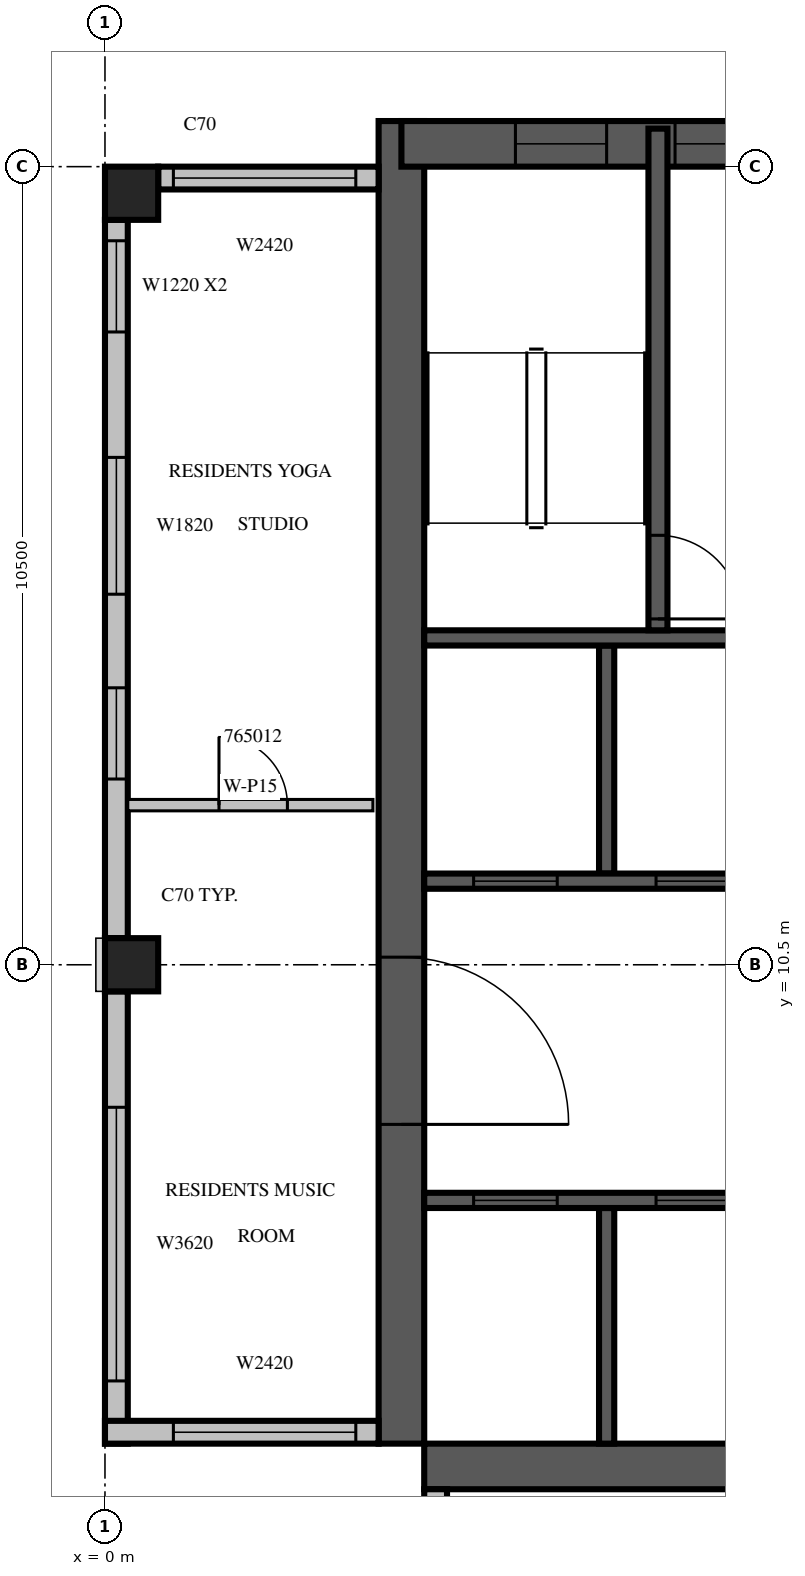
"""IFC4 building model, lengths in metres.
Left out: names, types, materials, properties, quantities, classifications, styles, units other than length and angle.
Written with IfcOpenShell. Run it as: python <this file> out.ifc"""

import sys

from ifc_helpers import new_model, si_unit, direction, frame, frame_2d, origin, origin_2d, place, context, subcontext, project, spatial, rectangle, extrude, source, transform, mapped, element, fill, save


model = new_model("IFC4")
c1 = context("Model", 3, precision=1e-05, world=origin(), true_north=direction((0.0, 1.0)))
c2 = subcontext(c1, "Body", "Model", "MODEL_VIEW")
j1 = project(units=[si_unit("LENGTHUNIT", "METRE"), si_unit("PLANEANGLEUNIT", "RADIAN")], contexts=[c1])
p1 = place(None, origin())
s1 = spatial("IfcSite", under=j1, at=p1, CompositionType="ELEMENT")
p2 = place(p1, origin())
s2 = spatial("IfcBuilding", under=s1, at=p2, CompositionType="ELEMENT")
p3 = place(p2, frame((0.0, 0.0, 288.0)))
s3 = spatial("IfcBuildingStorey", under=s2, at=p3, CompositionType="ELEMENT", Elevation=288.0)
m1 = source(origin(), c2, "Body", "SweptSolid", [
    extrude(rectangle(XDim=0.7, YDim=0.7, at=origin_2d()), origin(), (0.0, 0.0, 1.0), 3.5),
])
for number, where, z_axis, x_axis in (
    (1, (0.35, 10.5, 0.0), (0.0, 0.0, 1.0), (1.0, 0.0, 0.0)),
    (2, (0.35, 20.65, 0.0), (0.0, 0.0, 1.0), (1.0, 0.0, 0.0)),
):
    element("IfcColumn", number, at=place(p3, frame(where, z_axis=z_axis, x_axis=x_axis)), inside=s3, PredefinedType="COLUMN", context=c2, shape_type="MappedRepresentation", body=[
        mapped(m1, transform((0.0, 0.0, 0.0), scale=1.0)),
    ])
m2 = source(origin(), c2, "Body", "SweptSolid", [
    extrude(rectangle(XDim=17.4, YDim=0.6, at=frame_2d((8.7, 0.0))), origin(), (0.0, 0.0, 1.0), 3.5),
])
p4 = place(p3, frame((3.9, 4.2, 0.0), z_axis=(0.0, 0.0, 1.0), x_axis=(0.0, 1.0, 0.0)))
e3 = element("IfcWall", 3, at=p4, inside=s3, PredefinedType="SHEAR", context=c2, shape_type="MappedRepresentation", body=[
    mapped(m2, transform((0.0, 0.0, 0.0), scale=1.0)),
])
m3 = source(origin(), c2, "Body", "SweptSolid", [
    extrude(rectangle(XDim=2.2, YDim=2.1, at=frame_2d((1.1, 1.05))), frame((0.0, 0.31, 0.0), z_axis=(0.0, -1.0, 0.0), x_axis=(1.0, 0.0, 0.0)), (0.0, 0.0, 1.0), 0.62),
])
p5 = place(p4, frame((4.2, 0.0, 0.0)))
e4 = element("IfcOpeningElement", 4, at=p5, cuts=e3, PredefinedType="OPENING", context=c2, shape_type="MappedRepresentation", body=[
    mapped(m3, transform((0.0, 0.0, 0.0), scale=1.0)),
])
p6 = place(p3, frame((4.2, 3.9, 0.0), z_axis=(0.0, 0.0, 1.0), x_axis=(1.0, 0.0, 0.0)))
e5 = element("IfcWall", 5, at=p6, inside=s3, PredefinedType="SHEAR", context=c2, shape_type="MappedRepresentation", body=[
    mapped(m2, transform((0.0, 0.0, 0.0), scale=1.0)),
])
m4 = source(origin(), c2, "Body", "SweptSolid", [
    extrude(rectangle(XDim=0.9, YDim=2.1, at=frame_2d((0.45, 1.05))), frame((0.0, 0.31, 0.0), z_axis=(0.0, -1.0, 0.0), x_axis=(1.0, 0.0, 0.0)), (0.0, 0.0, 1.0), 0.62),
])
p7 = place(p6, frame((15.2, 0.0, 0.0)))
e6 = element("IfcOpeningElement", 6, at=p7, cuts=e5, PredefinedType="OPENING", context=c2, shape_type="MappedRepresentation", body=[
    mapped(m4, transform((0.0, 0.0, 0.0), scale=1.0)),
])
m5 = source(origin(), c2, "Body", "SweptSolid", [
    extrude(rectangle(XDim=6.6, YDim=0.6, at=frame_2d((3.3, 0.0))), origin(), (0.0, 0.0, 1.0), 3.5),
])
p8 = place(p3, frame((3.9, 21.3, 0.0), z_axis=(0.0, 0.0, 1.0), x_axis=(1.0, 0.0, 0.0)))
e7 = element("IfcWall", 7, at=p8, inside=s3, PredefinedType="SHEAR", context=c2, shape_type="MappedRepresentation", body=[
    mapped(m5, transform((0.0, 0.0, 0.0), scale=1.0)),
])
m6 = source(origin(), c2, "Body", "SweptSolid", [
    extrude(rectangle(XDim=1.2, YDim=2.4, at=frame_2d((0.6, 1.2))), frame((0.0, 0.31, 0.0), z_axis=(0.0, -1.0, 0.0), x_axis=(1.0, 0.0, 0.0)), (0.0, 0.0, 1.0), 0.62),
])
p9 = place(p8, frame((1.5, 0.0, 0.6)))
e8 = element("IfcOpeningElement", 8, at=p9, cuts=e7, PredefinedType="OPENING", context=c2, shape_type="MappedRepresentation", body=[
    mapped(m6, transform((0.0, 0.0, 0.0), scale=1.0)),
])
p10 = place(p8, frame((3.6, 0.0, 0.6)))
e9 = element("IfcOpeningElement", 9, at=p10, cuts=e7, PredefinedType="OPENING", context=c2, shape_type="MappedRepresentation", body=[
    mapped(m6, transform((0.0, 0.0, 0.0), scale=1.0)),
])
m7 = source(origin(), c2, "Body", "SweptSolid", [
    extrude(rectangle(XDim=2.9, YDim=0.3, at=frame_2d((1.45, 0.0))), origin(), (0.0, 0.0, 1.0), 3.1),
])
p11 = place(p3, frame((3.6, 20.85, 0.0), z_axis=(0.0, 0.0, 1.0), x_axis=(-1.0, 0.0, 0.0)))
e10 = element("IfcWall", 10, at=p11, inside=s3, PredefinedType="STANDARD", context=c2, shape_type="MappedRepresentation", body=[
    mapped(m7, transform((0.0, 0.0, 0.0), scale=1.0)),
])
m8 = source(origin(), c2, "Body", "SweptSolid", [
    extrude(rectangle(XDim=2.4, YDim=2.0, at=frame_2d((1.2, 1.0))), frame((0.0, 0.16, 0.0), z_axis=(0.0, -1.0, 0.0), x_axis=(1.0, 0.0, 0.0)), (0.0, 0.0, 1.0), 0.32),
])
p12 = place(p11, frame((0.3, 0.0, 0.6)))
e11 = element("IfcOpeningElement", 11, at=p12, cuts=e10, PredefinedType="OPENING", context=c2, shape_type="MappedRepresentation", body=[
    mapped(m8, transform((0.0, 0.0, 0.0), scale=1.0)),
])
p13 = place(p3, frame((0.15, 20.3, 0.0), z_axis=(0.0, 0.0, 1.0), x_axis=(0.0, -1.0, 0.0)))
e12 = element("IfcWall", 12, at=p13, inside=s3, PredefinedType="STANDARD", context=c2, shape_type="SweptSolid", body=[
    extrude(rectangle(XDim=9.45, YDim=0.3, at=frame_2d((4.725, 0.0))), origin(), (0.0, 0.0, 1.0), 3.1),
])
m9 = source(origin(), c2, "Body", "SweptSolid", [
    extrude(rectangle(XDim=1.2, YDim=2.0, at=frame_2d((0.6, 1.0))), frame((0.0, 0.16, 0.0), z_axis=(0.0, -1.0, 0.0), x_axis=(1.0, 0.0, 0.0)), (0.0, 0.0, 1.0), 0.32),
])
p14 = place(p13, frame((0.275, 0.0, 0.6)))
e13 = element("IfcOpeningElement", 13, at=p14, cuts=e12, PredefinedType="OPENING", context=c2, shape_type="MappedRepresentation", body=[
    mapped(m9, transform((0.0, 0.0, 0.0), scale=1.0)),
])
m10 = source(origin(), c2, "Body", "SweptSolid", [
    extrude(rectangle(XDim=1.8, YDim=2.0, at=frame_2d((0.9, 1.0))), frame((0.0, 0.16, 0.0), z_axis=(0.0, -1.0, 0.0), x_axis=(1.0, 0.0, 0.0)), (0.0, 0.0, 1.0), 0.32),
])
p15 = place(p13, frame((3.125, 0.0, 0.6)))
e14 = element("IfcOpeningElement", 14, at=p15, cuts=e12, PredefinedType="OPENING", context=c2, shape_type="MappedRepresentation", body=[
    mapped(m10, transform((0.0, 0.0, 0.0), scale=1.0)),
])
p16 = place(p13, frame((6.156, 0.0, 0.6)))
e15 = element("IfcOpeningElement", 15, at=p16, cuts=e12, PredefinedType="OPENING", context=c2, shape_type="MappedRepresentation", body=[
    mapped(m9, transform((0.0, 0.0, 0.0), scale=1.0)),
])
m11 = source(origin(), c2, "Body", "SweptSolid", [
    extrude(rectangle(XDim=5.95, YDim=0.3, at=frame_2d((2.975, 0.0))), origin(), (0.0, 0.0, 1.0), 3.1),
])
p17 = place(p3, frame((0.15, 10.15, 0.0), z_axis=(0.0, 0.0, 1.0), x_axis=(0.0, -1.0, 0.0)))
e16 = element("IfcWall", 16, at=p17, inside=s3, PredefinedType="STANDARD", context=c2, shape_type="MappedRepresentation", body=[
    mapped(m11, transform((0.0, 0.0, 0.0), scale=1.0)),
])
m12 = source(origin(), c2, "Body", "SweptSolid", [
    extrude(rectangle(XDim=3.6, YDim=2.0, at=frame_2d((1.8, 1.0))), frame((0.0, 0.16, 0.0), z_axis=(0.0, -1.0, 0.0), x_axis=(1.0, 0.0, 0.0)), (0.0, 0.0, 1.0), 0.32),
])
p18 = place(p17, frame((1.525, 0.0, 0.6)))
e17 = element("IfcOpeningElement", 17, at=p18, cuts=e16, PredefinedType="OPENING", context=c2, shape_type="MappedRepresentation", body=[
    mapped(m12, transform((0.0, 0.0, 0.0), scale=1.0)),
])
m13 = source(origin(), c2, "Body", "SweptSolid", [
    extrude(rectangle(XDim=3.6, YDim=0.3, at=frame_2d((1.8, 0.0))), origin(), (0.0, 0.0, 1.0), 3.1),
])
p19 = place(p3, frame((0.0, 4.35, 0.0), z_axis=(0.0, 0.0, 1.0), x_axis=(1.0, 0.0, 0.0)))
e18 = element("IfcWall", 18, at=p19, inside=s3, PredefinedType="STANDARD", context=c2, shape_type="MappedRepresentation", body=[
    mapped(m13, transform((0.0, 0.0, 0.0), scale=1.0)),
])
p20 = place(p19, frame((0.9, 0.0, 0.6)))
e19 = element("IfcOpeningElement", 19, at=p20, cuts=e18, PredefinedType="OPENING", context=c2, shape_type="MappedRepresentation", body=[
    mapped(m8, transform((0.0, 0.0, 0.0), scale=1.0)),
])
p21 = place(p3, frame((4.35, 3.6, 0.0), z_axis=(0.0, 0.0, 1.0), x_axis=(0.0, -1.0, 0.0)))
e20 = element("IfcWall", 20, at=p21, inside=s3, PredefinedType="STANDARD", context=c2, shape_type="MappedRepresentation", body=[
    mapped(m13, transform((0.0, 0.0, 0.0), scale=1.0)),
])
p22 = place(p21, frame((0.3, 0.0, 0.6)))
e21 = element("IfcOpeningElement", 21, at=p22, cuts=e20, PredefinedType="OPENING", context=c2, shape_type="MappedRepresentation", body=[
    mapped(m8, transform((0.0, 0.0, 0.0), scale=1.0)),
])
m14 = source(origin(), c2, "Body", "SweptSolid", [
    extrude(rectangle(XDim=3.1, YDim=0.2, at=frame_2d((1.55, 0.0))), origin(), (0.0, 0.0, 1.0), 3.5),
])
p23 = place(p3, frame((6.6, 4.2, 0.0), z_axis=(0.0, 0.0, 1.0), x_axis=(0.0, 1.0, 0.0)))
e22 = element("IfcWall", 22, at=p23, inside=s3, PredefinedType="SOLIDWALL", context=c2, shape_type="MappedRepresentation", body=[
    mapped(m14, transform((0.0, 0.0, 0.0), scale=1.0)),
])
m15 = source(origin(), c2, "Body", "SweptSolid", [
    extrude(rectangle(XDim=3.0, YDim=0.2, at=frame_2d((1.5, 0.0))), origin(), (0.0, 0.0, 1.0), 3.5),
])
p24 = place(p3, frame((6.6, 11.7, 0.0), z_axis=(0.0, 0.0, 1.0), x_axis=(0.0, 1.0, 0.0)))
e23 = element("IfcWall", 23, at=p24, inside=s3, PredefinedType="SOLIDWALL", context=c2, shape_type="MappedRepresentation", body=[
    mapped(m15, transform((0.0, 0.0, 0.0), scale=1.0)),
])
m16 = source(origin(), c2, "Body", "SweptSolid", [
    extrude(rectangle(XDim=9.6, YDim=0.2, at=frame_2d((4.8, 0.0))), origin(), (0.0, 0.0, 1.0), 3.5),
])
p25 = place(p3, frame((4.2, 7.4, 0.0), z_axis=(0.0, 0.0, 1.0), x_axis=(1.0, 0.0, 0.0)))
e24 = element("IfcWall", 24, at=p25, inside=s3, PredefinedType="SOLIDWALL", context=c2, shape_type="MappedRepresentation", body=[
    mapped(m16, transform((0.0, 0.0, 0.0), scale=1.0)),
])
m17 = source(origin(), c2, "Body", "SweptSolid", [
    extrude(rectangle(XDim=1.1, YDim=2.1, at=frame_2d((0.55, 1.05))), frame((0.0, 0.11, 0.0), z_axis=(0.0, -1.0, 0.0), x_axis=(1.0, 0.0, 0.0)), (0.0, 0.0, 1.0), 0.22),
])
p26 = place(p25, frame((0.65, 0.0, 0.0)))
e25 = element("IfcOpeningElement", 25, at=p26, cuts=e24, PredefinedType="OPENING", context=c2, shape_type="MappedRepresentation", body=[
    mapped(m17, transform((0.0, 0.0, 0.0), scale=1.0)),
])
p27 = place(p25, frame((3.05, 0.0, 0.0)))
e26 = element("IfcOpeningElement", 26, at=p27, cuts=e24, PredefinedType="OPENING", context=c2, shape_type="MappedRepresentation", body=[
    mapped(m17, transform((0.0, 0.0, 0.0), scale=1.0)),
])
p28 = place(p25, frame((5.45, 0.0, 0.0)))
e27 = element("IfcOpeningElement", 27, at=p28, cuts=e24, PredefinedType="OPENING", context=c2, shape_type="MappedRepresentation", body=[
    mapped(m17, transform((0.0, 0.0, 0.0), scale=1.0)),
])
p29 = place(p25, frame((7.85, 0.0, 0.0)))
e28 = element("IfcOpeningElement", 28, at=p29, cuts=e24, PredefinedType="OPENING", context=c2, shape_type="MappedRepresentation", body=[
    mapped(m17, transform((0.0, 0.0, 0.0), scale=1.0)),
])
m18 = source(origin(), c2, "Body", "SweptSolid", [
    extrude(rectangle(XDim=4.8, YDim=0.2, at=frame_2d((2.4, 0.0))), origin(), (0.0, 0.0, 1.0), 3.5),
])
p30 = place(p3, frame((4.2, 11.6, 0.0), z_axis=(0.0, 0.0, 1.0), x_axis=(1.0, 0.0, 0.0)))
e29 = element("IfcWall", 29, at=p30, inside=s3, PredefinedType="SOLIDWALL", context=c2, shape_type="MappedRepresentation", body=[
    mapped(m18, transform((0.0, 0.0, 0.0), scale=1.0)),
])
p31 = place(p30, frame((0.65, 0.0, 0.0)))
e30 = element("IfcOpeningElement", 30, at=p31, cuts=e29, PredefinedType="OPENING", context=c2, shape_type="MappedRepresentation", body=[
    mapped(m17, transform((0.0, 0.0, 0.0), scale=1.0)),
])
p32 = place(p30, frame((3.05, 0.0, 0.0)))
e31 = element("IfcOpeningElement", 31, at=p32, cuts=e29, PredefinedType="OPENING", context=c2, shape_type="MappedRepresentation", body=[
    mapped(m17, transform((0.0, 0.0, 0.0), scale=1.0)),
])
p33 = place(p3, frame((4.2, 14.8, 0.0), z_axis=(0.0, 0.0, 1.0), x_axis=(1.0, 0.0, 0.0)))
e32 = element("IfcWall", 32, at=p33, inside=s3, PredefinedType="SOLIDWALL", context=c2, shape_type="MappedRepresentation", body=[
    mapped(m18, transform((0.0, 0.0, 0.0), scale=1.0)),
])
m19 = source(origin(), c2, "Body", "SweptSolid", [
    extrude(rectangle(XDim=6.6, YDim=0.25, at=frame_2d((3.3, 0.0))), origin(), (0.0, 0.0, 1.0), 3.1),
])
p34 = place(p3, frame((7.275, 14.9, 0.0), z_axis=(0.0, 0.0, 1.0), x_axis=(0.0, 1.0, 0.0)))
e33 = element("IfcWall", 33, at=p34, inside=s3, PredefinedType="SOLIDWALL", context=c2, shape_type="MappedRepresentation", body=[
    mapped(m19, transform((0.0, 0.0, 0.0), scale=1.0)),
])
m20 = source(origin(), c2, "Body", "SweptSolid", [
    extrude(rectangle(XDim=1.1, YDim=2.1, at=frame_2d((0.55, 1.05))), frame((0.0, 0.135, 0.0), z_axis=(0.0, -1.0, 0.0), x_axis=(1.0, 0.0, 0.0)), (0.0, 0.0, 1.0), 0.27),
])
p35 = place(p34, frame((0.15, 0.0, 0.0)))
e34 = element("IfcOpeningElement", 34, at=p35, cuts=e33, PredefinedType="OPENING", context=c2, shape_type="MappedRepresentation", body=[
    mapped(m20, transform((0.0, 0.0, 0.0), scale=1.0)),
])
m21 = source(origin(), c2, "Body", "SweptSolid", [
    extrude(rectangle(XDim=3.225, YDim=0.15, at=frame_2d((1.613, 0.0))), origin(), (0.0, 0.0, 1.0), 3.1),
])
p36 = place(p3, frame((0.3, 12.6, 0.0), z_axis=(0.0, 0.0, 1.0), x_axis=(1.0, 0.0, 0.0)))
e35 = element("IfcWall", 35, at=p36, inside=s3, PredefinedType="PARTITIONING", context=c2, shape_type="MappedRepresentation", body=[
    mapped(m21, transform((0.0, 0.0, 0.0), scale=1.0)),
])
m22 = source(origin(), c2, "Body", "SweptSolid", [
    extrude(rectangle(XDim=0.9, YDim=2.1, at=frame_2d((0.45, 1.05))), frame((0.0, 0.085, 0.0), z_axis=(0.0, -1.0, 0.0), x_axis=(1.0, 0.0, 0.0)), (0.0, 0.0, 1.0), 0.17),
])
p37 = place(p36, frame((1.2, 0.0, 0.0)))
e36 = element("IfcOpeningElement", 36, at=p37, cuts=e35, PredefinedType="OPENING", context=c2, shape_type="MappedRepresentation", body=[
    mapped(m22, transform((0.0, 0.0, 0.0), scale=1.0)),
])
m23 = source(origin(), c2, "Body", "SweptSolid", [
    extrude(rectangle(XDim=2.4, YDim=2.0, at=frame_2d((1.2, 1.0))), frame((0.0, 0.03, 0.0), z_axis=(0.0, -1.0, 0.0), x_axis=(1.0, 0.0, 0.0)), (0.0, 0.0, 1.0), 0.06),
])
p38 = place(p12, origin())
e37 = element("IfcWindow", 37, at=p38, inside=s3, PartitioningType="SINGLE_PANEL", PredefinedType="WINDOW", context=c2, shape_type="MappedRepresentation", body=[
    mapped(m23, transform((0.0, 0.0, 0.0), scale=1.0)),
])
fill(e11, e37)
m24 = source(origin(), c2, "Body", "SweptSolid", [
    extrude(rectangle(XDim=1.2, YDim=2.0, at=frame_2d((0.6, 1.0))), frame((0.0, 0.03, 0.0), z_axis=(0.0, -1.0, 0.0), x_axis=(1.0, 0.0, 0.0)), (0.0, 0.0, 1.0), 0.06),
])
p39 = place(p14, origin())
e38 = element("IfcWindow", 38, at=p39, inside=s3, PartitioningType="SINGLE_PANEL", PredefinedType="WINDOW", context=c2, shape_type="MappedRepresentation", body=[
    mapped(m24, transform((0.0, 0.0, 0.0), scale=1.0)),
])
fill(e13, e38)
m25 = source(origin(), c2, "Body", "SweptSolid", [
    extrude(rectangle(XDim=1.8, YDim=2.0, at=frame_2d((0.9, 1.0))), frame((0.0, 0.03, 0.0), z_axis=(0.0, -1.0, 0.0), x_axis=(1.0, 0.0, 0.0)), (0.0, 0.0, 1.0), 0.06),
])
p40 = place(p15, origin())
e39 = element("IfcWindow", 39, at=p40, inside=s3, PartitioningType="SINGLE_PANEL", PredefinedType="WINDOW", context=c2, shape_type="MappedRepresentation", body=[
    mapped(m25, transform((0.0, 0.0, 0.0), scale=1.0)),
])
fill(e14, e39)
m26 = source(origin(), c2, "Body", "SweptSolid", [
    extrude(rectangle(XDim=3.6, YDim=2.0, at=frame_2d((1.8, 1.0))), frame((0.0, 0.03, 0.0), z_axis=(0.0, -1.0, 0.0), x_axis=(1.0, 0.0, 0.0)), (0.0, 0.0, 1.0), 0.06),
])
p41 = place(p18, origin())
e40 = element("IfcWindow", 40, at=p41, inside=s3, PartitioningType="SINGLE_PANEL", PredefinedType="WINDOW", context=c2, shape_type="MappedRepresentation", body=[
    mapped(m26, transform((0.0, 0.0, 0.0), scale=1.0)),
])
fill(e17, e40)
p42 = place(p16, origin())
e41 = element("IfcWindow", 41, at=p42, inside=s3, PartitioningType="SINGLE_PANEL", PredefinedType="WINDOW", context=c2, shape_type="MappedRepresentation", body=[
    mapped(m24, transform((0.0, 0.0, 0.0), scale=1.0)),
])
fill(e15, e41)
p43 = place(p20, origin())
e42 = element("IfcWindow", 42, at=p43, inside=s3, PartitioningType="SINGLE_PANEL", PredefinedType="WINDOW", context=c2, shape_type="MappedRepresentation", body=[
    mapped(m23, transform((0.0, 0.0, 0.0), scale=1.0)),
])
fill(e19, e42)
m27 = source(origin(), c2, "Body", "SweptSolid", [
    extrude(rectangle(XDim=1.1, YDim=2.1, at=frame_2d((0.55, 1.05))), frame((0.0, 0.025, 0.0), z_axis=(0.0, -1.0, 0.0), x_axis=(1.0, 0.0, 0.0)), (0.0, 0.0, 1.0), 0.05),
])
p44 = place(p26, origin())
e43 = element("IfcDoor", 43, at=p44, inside=s3, OperationType="SLIDING_TO_LEFT", PredefinedType="DOOR", context=c2, shape_type="MappedRepresentation", body=[
    mapped(m27, transform((0.0, 0.0, 0.0), scale=1.0)),
])
fill(e25, e43)
p45 = place(p27, origin())
e44 = element("IfcDoor", 44, at=p45, inside=s3, OperationType="SLIDING_TO_LEFT", PredefinedType="DOOR", context=c2, shape_type="MappedRepresentation", body=[
    mapped(m27, transform((0.0, 0.0, 0.0), scale=1.0)),
])
fill(e26, e44)
p46 = place(p31, origin())
e45 = element("IfcDoor", 45, at=p46, inside=s3, OperationType="SLIDING_TO_LEFT", PredefinedType="DOOR", context=c2, shape_type="MappedRepresentation", body=[
    mapped(m27, transform((0.0, 0.0, 0.0), scale=1.0)),
])
fill(e30, e45)
p47 = place(p32, origin())
e46 = element("IfcDoor", 46, at=p47, inside=s3, OperationType="SLIDING_TO_LEFT", PredefinedType="DOOR", context=c2, shape_type="MappedRepresentation", body=[
    mapped(m27, transform((0.0, 0.0, 0.0), scale=1.0)),
])
fill(e31, e46)
p48 = place(p35, origin())
e47 = element("IfcDoor", 47, at=p48, inside=s3, OperationType="SINGLE_SWING_RIGHT", PredefinedType="DOOR", context=c2, shape_type="MappedRepresentation", body=[
    mapped(m27, transform((0.0, 0.0, 0.0), scale=1.0)),
])
fill(e34, e47)
m28 = source(origin(), c2, "Body", "SweptSolid", [
    extrude(rectangle(XDim=2.2, YDim=2.1, at=frame_2d((1.1, 1.05))), frame((0.0, 0.025, 0.0), z_axis=(0.0, -1.0, 0.0), x_axis=(1.0, 0.0, 0.0)), (0.0, 0.0, 1.0), 0.05),
])
p49 = place(p5, origin())
e48 = element("IfcDoor", 48, at=p49, inside=s3, OperationType="DOUBLE_DOOR_SINGLE_SWING", PredefinedType="DOOR", context=c2, shape_type="MappedRepresentation", body=[
    mapped(m28, transform((0.0, 0.0, 0.0), scale=1.0)),
])
fill(e4, e48)
m29 = source(origin(), c2, "Body", "SweptSolid", [
    extrude(rectangle(XDim=1.2, YDim=2.4, at=frame_2d((0.6, 1.2))), frame((0.0, 0.03, 0.0), z_axis=(0.0, -1.0, 0.0), x_axis=(1.0, 0.0, 0.0)), (0.0, 0.0, 1.0), 0.06),
])
p50 = place(p9, origin())
e49 = element("IfcWindow", 49, at=p50, inside=s3, PartitioningType="SINGLE_PANEL", PredefinedType="WINDOW", context=c2, shape_type="MappedRepresentation", body=[
    mapped(m29, transform((0.0, 0.0, 0.0), scale=1.0)),
])
fill(e8, e49)
p51 = place(p10, origin())
e50 = element("IfcWindow", 50, at=p51, inside=s3, PartitioningType="SINGLE_PANEL", PredefinedType="WINDOW", context=c2, shape_type="MappedRepresentation", body=[
    mapped(m29, transform((0.0, 0.0, 0.0), scale=1.0)),
])
fill(e9, e50)
m30 = source(origin(), c2, "Body", "SweptSolid", [
    extrude(rectangle(XDim=0.9, YDim=2.1, at=frame_2d((0.45, 1.05))), frame((0.0, 0.025, 0.0), z_axis=(0.0, -1.0, 0.0), x_axis=(1.0, 0.0, 0.0)), (0.0, 0.0, 1.0), 0.05),
])
p52 = place(p37, origin())
e51 = element("IfcDoor", 51, at=p52, inside=s3, OperationType="SINGLE_SWING_LEFT", PredefinedType="DOOR", context=c2, shape_type="MappedRepresentation", body=[
    mapped(m30, transform((0.0, 0.0, 0.0), scale=1.0)),
])
fill(e36, e51)
save(model, sys.argv[1])
